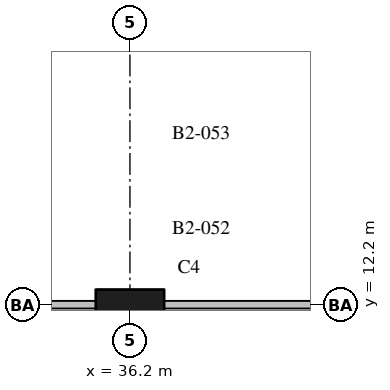
"""IFC4 building model, lengths in metres.
Left out: names, types, materials, properties, quantities, classifications, styles, units other than length and angle.
Written with IfcOpenShell. Run it as: python <this file> out.ifc"""

import sys

from ifc_helpers import new_model, si_unit, direction, frame, frame_2d, origin, origin_2d, place, context, subcontext, project, spatial, rectangle, extrude, element, save


model = new_model("IFC4")
c1 = context("Model", 3, precision=1e-05, world=origin(), true_north=direction((0.0, 1.0)))
c2 = subcontext(c1, "Body", "Model", "MODEL_VIEW")
j1 = project(units=[si_unit("LENGTHUNIT", "METRE"), si_unit("PLANEANGLEUNIT", "RADIAN")], contexts=[c1])
p1 = place(None, origin())
s1 = spatial("IfcSite", under=j1, at=p1, CompositionType="ELEMENT")
p2 = place(p1, origin())
s2 = spatial("IfcBuilding", under=s1, at=p2, CompositionType="ELEMENT")
p3 = place(p2, frame((0.0, 0.0, -12.0)))
s3 = spatial("IfcBuildingStorey", under=s2, at=p3, CompositionType="ELEMENT", Elevation=-12.0)
p4 = place(p3, frame((36.2, 12.2, 0.0), z_axis=(0.0, 0.0, 1.0), x_axis=(1.0, 0.0, 0.0)))
e1 = element("IfcColumn", 1, at=p4, inside=s3, PredefinedType="COLUMN", context=c2, shape_type="SweptSolid", body=[
    extrude(rectangle(XDim=1.8, YDim=0.8, at=origin_2d()), origin(), (0.0, 0.0, 1.0), 5.0),
])
p5 = place(p3, frame((25.7, 12.2, 0.0), z_axis=(0.0, 0.0, 1.0), x_axis=(1.0, 0.0, 0.0)))
e2 = element("IfcWall", 2, at=p5, inside=s3, PredefinedType="PARTITIONING", context=c2, shape_type="SweptSolid", body=[
    extrude(rectangle(XDim=20.55, YDim=0.2, at=frame_2d((10.275, 0.0))), origin(), (0.0, 0.0, 1.0), 4.598),
])
p6 = place(p5, frame((4.312, 0.0, 0.0)))
e3 = element("IfcOpeningElement", 3, at=p6, cuts=e2, PredefinedType="OPENING", context=c2, shape_type="SweptSolid", body=[
    extrude(rectangle(XDim=1.8, YDim=2.1, at=frame_2d((0.9, 1.05))), frame((0.0, 0.11, 0.0), z_axis=(0.0, -1.0, 0.0), x_axis=(1.0, 0.0, 0.0)), (0.0, 0.0, 1.0), 0.22),
])
p7 = place(p5, frame((15.56, 0.0, 0.0)))
e4 = element("IfcOpeningElement", 4, at=p7, cuts=e2, PredefinedType="OPENING", context=c2, shape_type="SweptSolid", body=[
    extrude(rectangle(XDim=1.8, YDim=2.1, at=frame_2d((0.9, 1.05))), frame((0.0, 0.11, 0.0), z_axis=(0.0, -1.0, 0.0), x_axis=(1.0, 0.0, 0.0)), (0.0, 0.0, 1.0), 0.22),
])
save(model, sys.argv[1])
